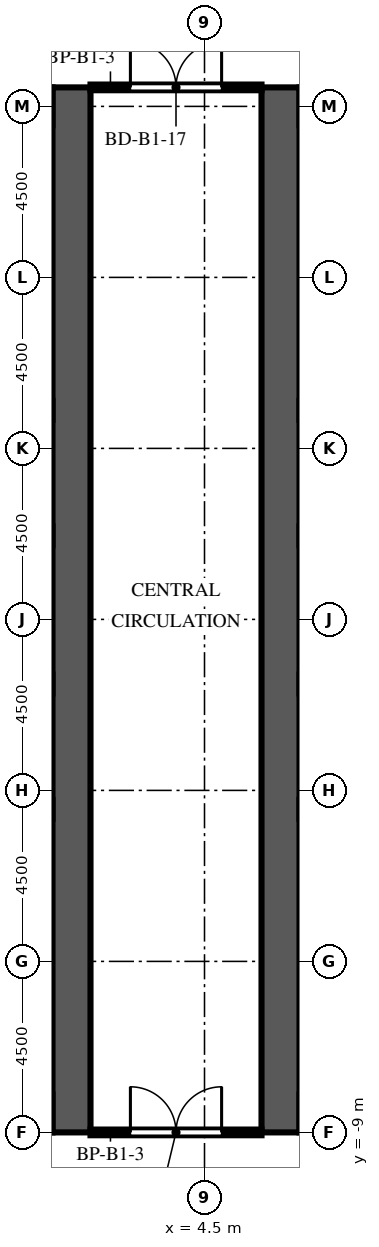
"""IFC4 building model, lengths in metres.
Left out: names, types, materials, properties, quantities, classifications, styles, units other than length and angle.
Written with IfcOpenShell. Run it as: python <this file> out.ifc"""

import sys

from ifc_helpers import new_model, si_unit, direction, frame, frame_2d, origin, place, context, subcontext, project, spatial, rectangle, extrude, element, fill, save


model = new_model("IFC4")
c1 = context("Model", 3, precision=1e-05, world=origin(), true_north=direction((0.0, 1.0)))
c2 = subcontext(c1, "Body", "Model", "MODEL_VIEW")
j1 = project(units=[si_unit("LENGTHUNIT", "METRE"), si_unit("PLANEANGLEUNIT", "RADIAN")], contexts=[c1])
p1 = place(None, origin())
s1 = spatial("IfcSite", under=j1, at=p1, CompositionType="ELEMENT")
p2 = place(p1, origin())
s2 = spatial("IfcBuilding", under=s1, at=p2, CompositionType="ELEMENT")
p3 = place(p2, frame((0.0, 0.0, -5.0)))
s3 = spatial("IfcBuildingStorey", under=s2, at=p3, CompositionType="ELEMENT", Elevation=-5.0)
p4 = place(p3, frame((1.0, -9.0, 0.0), z_axis=(0.0, 0.0, 1.0), x_axis=(0.0, 1.0, 0.0)))
e1 = element("IfcWall", 1, at=p4, inside=s3, PredefinedType="SHEAR", context=c2, shape_type="SweptSolid", body=[
    extrude(rectangle(XDim=27.5, YDim=1.0, at=frame_2d((13.75, 0.0))), origin(), (0.0, 0.0, 1.0), 5.0),
])
p5 = place(p4, frame((12.55, 0.0, 0.0)))
e2 = element("IfcOpeningElement", 2, at=p5, cuts=e1, PredefinedType="OPENING", context=c2, shape_type="SweptSolid", body=[
    extrude(rectangle(XDim=2.4, YDim=2.4, at=frame_2d((1.2, 1.2))), frame((0.0, 0.51, 0.0), z_axis=(0.0, -1.0, 0.0), x_axis=(1.0, 0.0, 0.0)), (0.0, 0.0, 1.0), 1.02),
])
p6 = place(p4, frame((5.55, 0.0, 0.0)))
e3 = element("IfcOpeningElement", 3, at=p6, cuts=e1, PredefinedType="OPENING", context=c2, shape_type="SweptSolid", body=[
    extrude(rectangle(XDim=0.905, YDim=2.1, at=frame_2d((0.453, 1.05))), frame((0.0, 0.51, 0.0), z_axis=(0.0, -1.0, 0.0), x_axis=(1.0, 0.0, 0.0)), (0.0, 0.0, 1.0), 1.02),
])
p7 = place(p4, frame((23.363, 0.0, 0.0)))
e4 = element("IfcOpeningElement", 4, at=p7, cuts=e1, PredefinedType="OPENING", context=c2, shape_type="SweptSolid", body=[
    extrude(rectangle(XDim=1.2, YDim=2.1, at=frame_2d((0.6, 1.05))), frame((0.0, 0.51, 0.0), z_axis=(0.0, -1.0, 0.0), x_axis=(1.0, 0.0, 0.0)), (0.0, 0.0, 1.0), 1.02),
])
p8 = place(p3, frame((6.5, -9.0, 0.0), z_axis=(0.0, 0.0, 1.0), x_axis=(0.0, 1.0, 0.0)))
e5 = element("IfcWall", 5, at=p8, inside=s3, PredefinedType="SHEAR", context=c2, shape_type="SweptSolid", body=[
    extrude(rectangle(XDim=27.5, YDim=1.0, at=frame_2d((13.75, 0.0))), origin(), (0.0, 0.0, 1.0), 5.0),
])
p9 = place(p8, frame((12.55, 0.0, 0.0)))
e6 = element("IfcOpeningElement", 6, at=p9, cuts=e5, PredefinedType="OPENING", context=c2, shape_type="SweptSolid", body=[
    extrude(rectangle(XDim=2.4, YDim=2.4, at=frame_2d((1.2, 1.2))), frame((0.0, 0.51, 0.0), z_axis=(0.0, -1.0, 0.0), x_axis=(1.0, 0.0, 0.0)), (0.0, 0.0, 1.0), 1.02),
])
p10 = place(p8, frame((5.55, 0.0, 0.0)))
e7 = element("IfcOpeningElement", 7, at=p10, cuts=e5, PredefinedType="OPENING", context=c2, shape_type="SweptSolid", body=[
    extrude(rectangle(XDim=0.905, YDim=2.1, at=frame_2d((0.453, 1.05))), frame((0.0, 0.51, 0.0), z_axis=(0.0, -1.0, 0.0), x_axis=(1.0, 0.0, 0.0)), (0.0, 0.0, 1.0), 1.02),
])
p11 = place(p8, frame((23.363, 0.0, 0.0)))
e8 = element("IfcOpeningElement", 8, at=p11, cuts=e5, PredefinedType="OPENING", context=c2, shape_type="SweptSolid", body=[
    extrude(rectangle(XDim=1.2, YDim=2.1, at=frame_2d((0.6, 1.05))), frame((0.0, 0.51, 0.0), z_axis=(0.0, -1.0, 0.0), x_axis=(1.0, 0.0, 0.0)), (0.0, 0.0, 1.0), 1.02),
])
p12 = place(p3, frame((7.0, 12.425, 0.0), z_axis=(0.0, 0.0, 1.0), x_axis=(1.0, 0.0, 0.0)))
e9 = element("IfcWall", 9, at=p12, inside=s3, PredefinedType="PARTITIONING", context=c2, shape_type="SweptSolid", body=[
    extrude(rectangle(XDim=1.3, YDim=0.1, at=frame_2d((0.65, 0.0))), origin(), (0.0, 0.0, 1.0), 4.5),
])
p13 = place(p12, frame((0.2, 0.0, 0.0)))
e10 = element("IfcOpeningElement", 10, at=p13, cuts=e9, PredefinedType="OPENING", context=c2, shape_type="SweptSolid", body=[
    extrude(rectangle(XDim=0.9, YDim=2.1, at=frame_2d((0.45, 1.05))), frame((0.0, 0.06, 0.0), z_axis=(0.0, -1.0, 0.0), x_axis=(1.0, 0.0, 0.0)), (0.0, 0.0, 1.0), 0.12),
])
p14 = place(p3, frame((1.5, -9.0, 0.0), z_axis=(0.0, 0.0, 1.0), x_axis=(1.0, 0.0, 0.0)))
e11 = element("IfcWall", 11, at=p14, inside=s3, PredefinedType="PARTITIONING", context=c2, shape_type="SweptSolid", body=[
    extrude(rectangle(XDim=4.5, YDim=0.15, at=frame_2d((2.25, 0.0))), origin(), (0.0, 0.0, 1.0), 4.5),
])
p15 = place(p14, frame((1.05, 0.0, 0.0)))
e12 = element("IfcOpeningElement", 12, at=p15, cuts=e11, PredefinedType="OPENING", context=c2, shape_type="SweptSolid", body=[
    extrude(rectangle(XDim=2.4, YDim=2.4, at=frame_2d((1.2, 1.2))), frame((0.0, 0.085, 0.0), z_axis=(0.0, -1.0, 0.0), x_axis=(1.0, 0.0, 0.0)), (0.0, 0.0, 1.0), 0.17),
])
p16 = place(p3, frame((1.5, 18.5, 0.0), z_axis=(0.0, 0.0, 1.0), x_axis=(1.0, 0.0, 0.0)))
e13 = element("IfcWall", 13, at=p16, inside=s3, PredefinedType="PARTITIONING", context=c2, shape_type="SweptSolid", body=[
    extrude(rectangle(XDim=4.5, YDim=0.15, at=frame_2d((2.25, 0.0))), origin(), (0.0, 0.0, 1.0), 4.5),
])
p17 = place(p16, frame((1.05, 0.0, 0.0)))
e14 = element("IfcOpeningElement", 14, at=p17, cuts=e13, PredefinedType="OPENING", context=c2, shape_type="SweptSolid", body=[
    extrude(rectangle(XDim=2.4, YDim=2.4, at=frame_2d((1.2, 1.2))), frame((0.0, 0.085, 0.0), z_axis=(0.0, -1.0, 0.0), x_axis=(1.0, 0.0, 0.0)), (0.0, 0.0, 1.0), 0.17),
])
p18 = place(p5, origin())
e15 = element("IfcDoor", 15, at=p18, inside=s3, OperationType="DOUBLE_DOOR_DOUBLE_SWING", PredefinedType="DOOR", context=c2, shape_type="SweptSolid", body=[
    extrude(rectangle(XDim=2.4, YDim=2.4, at=frame_2d((1.2, 1.2))), frame((0.0, 0.025, 0.0), z_axis=(0.0, -1.0, 0.0), x_axis=(1.0, 0.0, 0.0)), (0.0, 0.0, 1.0), 0.05),
])
fill(e2, e15)
p19 = place(p9, origin())
e16 = element("IfcDoor", 16, at=p19, inside=s3, OperationType="DOUBLE_DOOR_DOUBLE_SWING", PredefinedType="DOOR", context=c2, shape_type="SweptSolid", body=[
    extrude(rectangle(XDim=2.4, YDim=2.4, at=frame_2d((1.2, 1.2))), frame((0.0, 0.025, 0.0), z_axis=(0.0, -1.0, 0.0), x_axis=(1.0, 0.0, 0.0)), (0.0, 0.0, 1.0), 0.05),
])
fill(e6, e16)
p20 = place(p6, origin())
e17 = element("IfcDoor", 17, at=p20, inside=s3, OperationType="SINGLE_SWING_LEFT", PredefinedType="DOOR", context=c2, shape_type="SweptSolid", body=[
    extrude(rectangle(XDim=0.905, YDim=2.1, at=frame_2d((0.453, 1.05))), frame((0.0, 0.475, 0.0), z_axis=(0.0, -1.0, 0.0), x_axis=(1.0, 0.0, 0.0)), (0.0, 0.0, 1.0), 0.05),
])
fill(e3, e17)
p21 = place(p7, origin())
e18 = element("IfcDoor", 18, at=p21, inside=s3, OperationType="SINGLE_SWING_RIGHT", PredefinedType="DOOR", context=c2, shape_type="SweptSolid", body=[
    extrude(rectangle(XDim=1.2, YDim=2.1, at=frame_2d((0.6, 1.05))), frame((0.0, 0.475, 0.0), z_axis=(0.0, -1.0, 0.0), x_axis=(1.0, 0.0, 0.0)), (0.0, 0.0, 1.0), 0.05),
])
fill(e4, e18)
p22 = place(p10, origin())
e19 = element("IfcDoor", 19, at=p22, inside=s3, OperationType="SINGLE_SWING_RIGHT", PredefinedType="DOOR", context=c2, shape_type="SweptSolid", body=[
    extrude(rectangle(XDim=0.905, YDim=2.1, at=frame_2d((0.453, 1.05))), frame((0.0, -0.425, 0.0), z_axis=(0.0, -1.0, 0.0), x_axis=(1.0, 0.0, 0.0)), (0.0, 0.0, 1.0), 0.05),
])
fill(e7, e19)
p23 = place(p11, origin())
e20 = element("IfcDoor", 20, at=p23, inside=s3, OperationType="SINGLE_SWING_LEFT", PredefinedType="DOOR", context=c2, shape_type="SweptSolid", body=[
    extrude(rectangle(XDim=1.2, YDim=2.1, at=frame_2d((0.6, 1.05))), frame((0.0, -0.425, 0.0), z_axis=(0.0, -1.0, 0.0), x_axis=(1.0, 0.0, 0.0)), (0.0, 0.0, 1.0), 0.05),
])
fill(e8, e20)
p24 = place(p15, origin())
e21 = element("IfcDoor", 21, at=p24, inside=s3, OperationType="DOUBLE_DOOR_DOUBLE_SWING", PredefinedType="DOOR", context=c2, shape_type="SweptSolid", body=[
    extrude(rectangle(XDim=2.4, YDim=2.4, at=frame_2d((1.2, 1.2))), frame((0.0, 0.025, 0.0), z_axis=(0.0, -1.0, 0.0), x_axis=(1.0, 0.0, 0.0)), (0.0, 0.0, 1.0), 0.05),
])
fill(e12, e21)
p25 = place(p17, origin())
e22 = element("IfcDoor", 22, at=p25, inside=s3, OperationType="DOUBLE_DOOR_DOUBLE_SWING", PredefinedType="DOOR", context=c2, shape_type="SweptSolid", body=[
    extrude(rectangle(XDim=2.4, YDim=2.4, at=frame_2d((1.2, 1.2))), frame((0.0, 0.025, 0.0), z_axis=(0.0, -1.0, 0.0), x_axis=(1.0, 0.0, 0.0)), (0.0, 0.0, 1.0), 0.05),
])
fill(e14, e22)
save(model, sys.argv[1])
